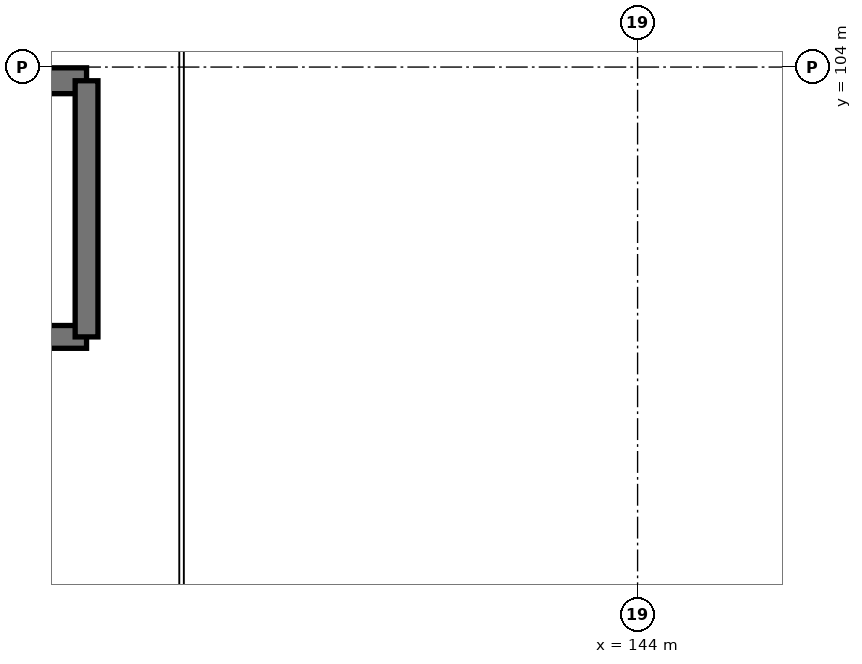
"""IFC4 building model, lengths in metres.
Left out: names, types, materials, properties, quantities, classifications, styles, units other than length and angle.
Written with IfcOpenShell. Run it as: python <this file> out.ifc"""

import sys

from ifc_helpers import new_model, si_unit, direction, frame, frame_2d, origin, place, context, subcontext, project, spatial, rectangle, extrude, element, save


model = new_model("IFC4")
c1 = context("Model", 3, precision=1e-05, world=origin(), true_north=direction((0.0, 1.0)))
c2 = subcontext(c1, "Body", "Model", "MODEL_VIEW")
j1 = project(units=[si_unit("LENGTHUNIT", "METRE"), si_unit("PLANEANGLEUNIT", "RADIAN")], contexts=[c1])
p1 = place(None, origin())
s1 = spatial("IfcSite", under=j1, at=p1, CompositionType="ELEMENT")
p2 = place(p1, origin())
s2 = spatial("IfcBuilding", under=s1, at=p2, CompositionType="ELEMENT")
p3 = place(p2, frame((0.0, 0.0, -3.84)))
s3 = spatial("IfcBuildingStorey", under=s2, at=p3, CompositionType="ELEMENT", Elevation=-3.84)
p4 = place(p3, frame((129.85, 100.45, 0.0), z_axis=(0.0, 0.0, 1.0), x_axis=(1.0, 0.0, 0.0)))
e1 = element("IfcWall", 1, at=p4, inside=s3, PredefinedType="SHEAR", context=c2, shape_type="SweptSolid", body=[
    extrude(rectangle(XDim=6.9, YDim=0.3, at=frame_2d((3.45, 0.0))), origin(), (0.0, 0.0, 1.0), 3.84),
])
p5 = place(p3, frame((136.75, 103.82, 0.0), z_axis=(0.0, 0.0, 1.0), x_axis=(-1.0, 0.0, 0.0)))
e2 = element("IfcWall", 2, at=p5, inside=s3, PredefinedType="SHEAR", context=c2, shape_type="SweptSolid", body=[
    extrude(rectangle(XDim=6.9, YDim=0.34, at=frame_2d((3.45, 0.0))), origin(), (0.0, 0.0, 1.0), 3.84),
])
p6 = place(p3, frame((136.75, 100.45, 0.0), z_axis=(0.0, 0.0, 1.0), x_axis=(0.0, 1.0, 0.0)))
e3 = element("IfcWall", 3, at=p6, inside=s3, PredefinedType="SHEAR", context=c2, shape_type="SweptSolid", body=[
    extrude(rectangle(XDim=3.37, YDim=0.3, at=frame_2d((1.685, 0.0))), origin(), (0.0, 0.0, 1.0), 3.84),
])
save(model, sys.argv[1])
